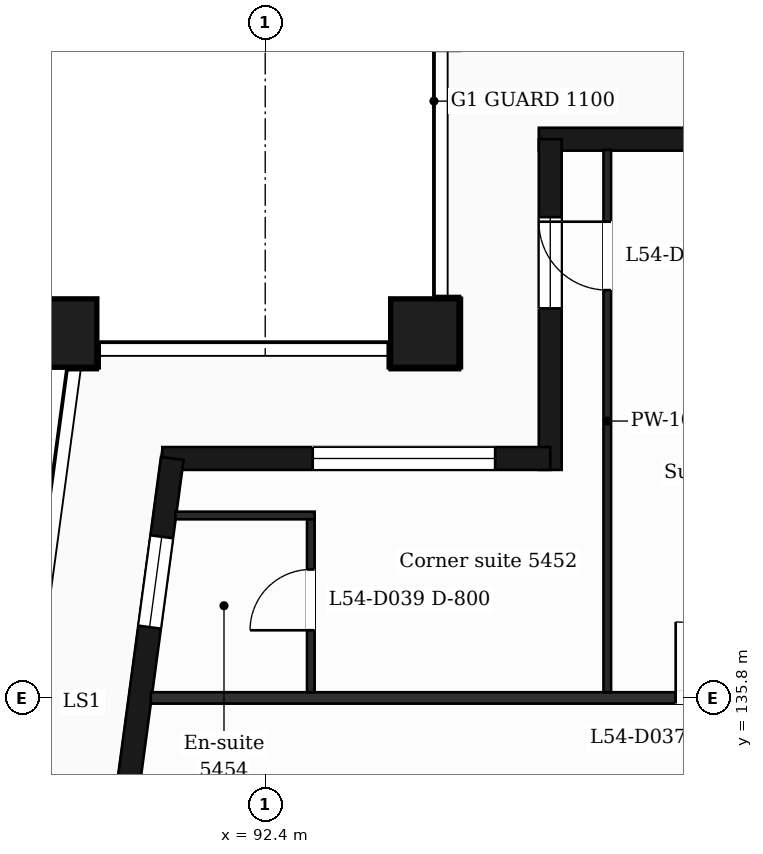
"""IFC4 building model, lengths in metres.
Left out: names, types, materials, properties, quantities, classifications, styles, units other than length and angle.
Written with IfcOpenShell. Run it as: python <this file> out.ifc"""

import sys

from ifc_helpers import new_model, si_unit, direction, frame, frame_2d, origin, origin_2d, place, context, subcontext, project, spatial, rectangle, extrude, element, fill, save


model = new_model("IFC4")
c1 = context("Model", 3, precision=1e-05, world=origin(), true_north=direction((0.0, 1.0)))
c2 = subcontext(c1, "Body", "Model", "MODEL_VIEW")
j1 = project(units=[si_unit("LENGTHUNIT", "METRE"), si_unit("PLANEANGLEUNIT", "RADIAN")], contexts=[c1])
p1 = place(None, origin())
s1 = spatial("IfcSite", under=j1, at=p1, CompositionType="ELEMENT")
p2 = place(p1, origin())
s2 = spatial("IfcBuilding", under=s1, at=p2, CompositionType="ELEMENT")
p3 = place(p2, frame((0.0, 0.0, 224.4)))
s3 = spatial("IfcBuildingStorey", under=s2, at=p3, CompositionType="ELEMENT", Elevation=224.4)
for number, where, z_axis, x_axis in (
    (1, (94.5, 140.6, 0.0), (0.0, 0.0, 1.0), (1.0, 0.0, 0.0)),
    (2, (89.735, 140.6, 0.0), (0.0, 0.0, 1.0), (1.0, 0.0, 0.0)),
):
    element("IfcColumn", number, at=place(p3, frame(where, z_axis=z_axis, x_axis=x_axis)), inside=s3, PredefinedType="COLUMN", context=c2, shape_type="SweptSolid", body=[
        extrude(rectangle(XDim=0.9, YDim=0.9, at=origin_2d()), origin(), (0.0, 0.0, 1.0), 3.7),
    ])
p4 = place(p3, frame((110.4, 143.15, 0.0), z_axis=(0.0, 0.0, 1.0), x_axis=(-1.0, 0.0, 0.0)))
e3 = element("IfcWall", 3, at=p4, inside=s3, PredefinedType="SOLIDWALL", context=c2, shape_type="SweptSolid", body=[
    extrude(rectangle(XDim=14.4, YDim=0.3, at=frame_2d((7.2, 0.0))), origin(), (0.0, 0.0, 1.0), 3.38),
])
p5 = place(p4, frame((2.1, 0.0, 0.9)))
e4 = element("IfcOpeningElement", 4, at=p5, cuts=e3, PredefinedType="OPENING", context=c2, shape_type="SweptSolid", body=[
    extrude(rectangle(XDim=2.4, YDim=2.1, at=frame_2d((1.2, 1.05))), frame((0.0, 0.16, 0.0), z_axis=(0.0, -1.0, 0.0), x_axis=(1.0, 0.0, 0.0)), (0.0, 0.0, 1.0), 0.32),
])
p6 = place(p4, frame((6.9, 0.0, 0.0)))
e5 = element("IfcOpeningElement", 5, at=p6, cuts=e3, PredefinedType="OPENING", context=c2, shape_type="SweptSolid", body=[
    extrude(rectangle(XDim=1.2, YDim=2.4, at=frame_2d((0.6, 1.2))), frame((0.0, 0.16, 0.0), z_axis=(0.0, -1.0, 0.0), x_axis=(1.0, 0.0, 0.0)), (0.0, 0.0, 1.0), 0.32),
])
p7 = place(p4, frame((11.1, 0.0, 0.9)))
e6 = element("IfcOpeningElement", 6, at=p7, cuts=e3, PredefinedType="OPENING", context=c2, shape_type="SweptSolid", body=[
    extrude(rectangle(XDim=1.2, YDim=2.1, at=frame_2d((0.6, 1.05))), frame((0.0, 0.16, 0.0), z_axis=(0.0, -1.0, 0.0), x_axis=(1.0, 0.0, 0.0)), (0.0, 0.0, 1.0), 0.32),
])
p8 = place(p3, frame((96.15, 143.15, 0.0), z_axis=(0.0, 0.0, 1.0), x_axis=(0.0, -1.0, 0.0)))
e7 = element("IfcWall", 7, at=p8, inside=s3, PredefinedType="SOLIDWALL", context=c2, shape_type="SweptSolid", body=[
    extrude(rectangle(XDim=4.35, YDim=0.3, at=frame_2d((2.175, 0.0))), origin(), (0.0, 0.0, 1.0), 3.38),
])
p9 = place(p8, frame((1.025, 0.0, 0.9)))
e8 = element("IfcOpeningElement", 8, at=p9, cuts=e7, PredefinedType="OPENING", context=c2, shape_type="SweptSolid", body=[
    extrude(rectangle(XDim=1.2, YDim=2.1, at=frame_2d((0.6, 1.05))), frame((0.0, 0.16, 0.0), z_axis=(0.0, -1.0, 0.0), x_axis=(1.0, 0.0, 0.0)), (0.0, 0.0, 1.0), 0.32),
])
p10 = place(p3, frame((96.15, 138.95, 0.0), z_axis=(0.0, 0.0, 1.0), x_axis=(-1.0, 0.0, 0.0)))
e9 = element("IfcWall", 9, at=p10, inside=s3, PredefinedType="SOLIDWALL", context=c2, shape_type="SweptSolid", body=[
    extrude(rectangle(XDim=5.104, YDim=0.3, at=frame_2d((2.552, 0.0))), origin(), (0.0, 0.0, 1.0), 3.38),
])
p11 = place(p10, frame((0.725, 0.0, 0.9)))
e10 = element("IfcOpeningElement", 10, at=p11, cuts=e9, PredefinedType="OPENING", context=c2, shape_type="SweptSolid", body=[
    extrude(rectangle(XDim=2.4, YDim=2.1, at=frame_2d((1.2, 1.05))), frame((0.0, 0.16, 0.0), z_axis=(0.0, -1.0, 0.0), x_axis=(1.0, 0.0, 0.0)), (0.0, 0.0, 1.0), 0.32),
])
p12 = place(p3, frame((91.177, 138.95, 0.0), z_axis=(0.0, 0.0, 1.0), x_axis=(-0.133426664613, -0.991058689065, 0.0)))
e11 = element("IfcWall", 11, at=p12, inside=s3, PredefinedType="SOLIDWALL", context=c2, shape_type="SweptSolid", body=[
    extrude(rectangle(XDim=6.609, YDim=0.3, at=frame_2d((3.305, 0.0))), origin(), (0.0, 0.0, 1.0), 3.38),
])
p13 = place(p12, frame((1.039, 0.0, 0.9)))
e12 = element("IfcOpeningElement", 12, at=p13, cuts=e11, PredefinedType="OPENING", context=c2, shape_type="SweptSolid", body=[
    extrude(rectangle(XDim=1.2, YDim=2.1, at=frame_2d((0.6, 1.05))), frame((0.0, 0.16, 0.0), z_axis=(0.0, -1.0, 0.0), x_axis=(1.0, 0.0, 0.0)), (0.0, 0.0, 1.0), 0.32),
])
p14 = place(p12, frame((4.294, 0.0, 0.0)))
e13 = element("IfcOpeningElement", 13, at=p14, cuts=e11, PredefinedType="OPENING", context=c2, shape_type="SweptSolid", body=[
    extrude(rectangle(XDim=1.2, YDim=2.4, at=frame_2d((0.6, 1.2))), frame((0.0, 0.16, 0.0), z_axis=(0.0, -1.0, 0.0), x_axis=(1.0, 0.0, 0.0)), (0.0, 0.0, 1.0), 0.32),
])
p15 = place(p3, frame((90.895, 135.8, 0.0), z_axis=(0.0, 0.0, 1.0), x_axis=(1.0, 0.0, 0.0)))
e14 = element("IfcWall", 14, at=p15, inside=s3, PredefinedType="PARTITIONING", context=c2, shape_type="SweptSolid", body=[
    extrude(rectangle(XDim=45.011, YDim=0.15, at=frame_2d((22.505, 0.0))), origin(), (0.0, 0.0, 1.0), 3.38),
])
p16 = place(p15, frame((6.906, 0.0, 0.0)))
e15 = element("IfcOpeningElement", 15, at=p16, cuts=e14, PredefinedType="OPENING", context=c2, shape_type="SweptSolid", body=[
    extrude(rectangle(XDim=1.0, YDim=2.1, at=frame_2d((0.5, 1.05))), frame((0.0, 0.085, 0.0), z_axis=(0.0, -1.0, 0.0), x_axis=(1.0, 0.0, 0.0)), (0.0, 0.0, 1.0), 0.17),
])
p17 = place(p15, frame((15.281, 0.0, 0.0)))
e16 = element("IfcOpeningElement", 16, at=p17, cuts=e14, PredefinedType="OPENING", context=c2, shape_type="SweptSolid", body=[
    extrude(rectangle(XDim=1.0, YDim=2.1, at=frame_2d((0.5, 1.05))), frame((0.0, 0.085, 0.0), z_axis=(0.0, -1.0, 0.0), x_axis=(1.0, 0.0, 0.0)), (0.0, 0.0, 1.0), 0.17),
])
p18 = place(p15, frame((25.045, 0.0, 0.0)))
e17 = element("IfcOpeningElement", 17, at=p18, cuts=e14, PredefinedType="OPENING", context=c2, shape_type="SweptSolid", body=[
    extrude(rectangle(XDim=1.0, YDim=2.1, at=frame_2d((0.5, 1.05))), frame((0.0, 0.085, 0.0), z_axis=(0.0, -1.0, 0.0), x_axis=(1.0, 0.0, 0.0)), (0.0, 0.0, 1.0), 0.17),
])
p19 = place(p15, frame((29.531, 0.0, 0.0)))
e18 = element("IfcOpeningElement", 18, at=p19, cuts=e14, PredefinedType="OPENING", context=c2, shape_type="SweptSolid", body=[
    extrude(rectangle(XDim=0.95, YDim=2.1, at=frame_2d((0.475, 1.05))), frame((0.0, 0.085, 0.0), z_axis=(0.0, -1.0, 0.0), x_axis=(1.0, 0.0, 0.0)), (0.0, 0.0, 1.0), 0.17),
])
p20 = place(p15, frame((39.814, 0.0, 0.0)))
e19 = element("IfcOpeningElement", 19, at=p20, cuts=e14, PredefinedType="OPENING", context=c2, shape_type="SweptSolid", body=[
    extrude(rectangle(XDim=0.95, YDim=2.1, at=frame_2d((0.475, 1.05))), frame((0.0, 0.085, 0.0), z_axis=(0.0, -1.0, 0.0), x_axis=(1.0, 0.0, 0.0)), (0.0, 0.0, 1.0), 0.17),
])
p21 = place(p3, frame((91.218, 138.2, 0.0), z_axis=(0.0, 0.0, 1.0), x_axis=(1.0, 0.0, 0.0)))
e20 = element("IfcWall", 20, at=p21, inside=s3, PredefinedType="PARTITIONING", context=c2, shape_type="SweptSolid", body=[
    extrude(rectangle(XDim=1.832, YDim=0.1, at=frame_2d((0.916, 0.0))), origin(), (0.0, 0.0, 1.0), 3.38),
])
p22 = place(p3, frame((93.0, 135.875, 0.0), z_axis=(0.0, 0.0, 1.0), x_axis=(0.0, 1.0, 0.0)))
e21 = element("IfcWall", 21, at=p22, inside=s3, PredefinedType="PARTITIONING", context=c2, shape_type="SweptSolid", body=[
    extrude(rectangle(XDim=2.275, YDim=0.1, at=frame_2d((1.137, 0.0))), origin(), (0.0, 0.0, 1.0), 3.38),
])
p23 = place(p22, frame((0.815, 0.0, 0.0)))
e22 = element("IfcOpeningElement", 22, at=p23, cuts=e21, PredefinedType="OPENING", context=c2, shape_type="SweptSolid", body=[
    extrude(rectangle(XDim=0.8, YDim=2.1, at=frame_2d((0.4, 1.05))), frame((0.0, 0.06, 0.0), z_axis=(0.0, -1.0, 0.0), x_axis=(1.0, 0.0, 0.0)), (0.0, 0.0, 1.0), 0.12),
])
p24 = place(p3, frame((96.9, 135.875, 0.0), z_axis=(0.0, 0.0, 1.0), x_axis=(0.0, 1.0, 0.0)))
e23 = element("IfcWall", 23, at=p24, inside=s3, PredefinedType="PARTITIONING", context=c2, shape_type="SweptSolid", body=[
    extrude(rectangle(XDim=7.135, YDim=0.1, at=frame_2d((3.567, 0.0))), origin(), (0.0, 0.0, 1.0), 3.38),
])
p25 = place(p24, frame((5.29, 0.0, 0.0)))
e24 = element("IfcOpeningElement", 24, at=p25, cuts=e23, PredefinedType="OPENING", context=c2, shape_type="SweptSolid", body=[
    extrude(rectangle(XDim=0.9, YDim=2.1, at=frame_2d((0.45, 1.05))), frame((0.0, 0.06, 0.0), z_axis=(0.0, -1.0, 0.0), x_axis=(1.0, 0.0, 0.0)), (0.0, 0.0, 1.0), 0.12),
])
p26 = place(p9, origin())
e25 = element("IfcWindow", 25, at=p26, inside=s3, PartitioningType="SINGLE_PANEL", PredefinedType="WINDOW", context=c2, shape_type="SweptSolid", body=[
    extrude(rectangle(XDim=1.2, YDim=2.1, at=frame_2d((0.6, 1.05))), frame((0.0, 0.03, 0.0), z_axis=(0.0, -1.0, 0.0), x_axis=(1.0, 0.0, 0.0)), (0.0, 0.0, 1.0), 0.06),
])
fill(e8, e25)
p27 = place(p11, origin())
e26 = element("IfcWindow", 26, at=p27, inside=s3, PartitioningType="SINGLE_PANEL", PredefinedType="WINDOW", context=c2, shape_type="SweptSolid", body=[
    extrude(rectangle(XDim=2.4, YDim=2.1, at=frame_2d((1.2, 1.05))), frame((0.0, 0.03, 0.0), z_axis=(0.0, -1.0, 0.0), x_axis=(1.0, 0.0, 0.0)), (0.0, 0.0, 1.0), 0.06),
])
fill(e10, e26)
p28 = place(p13, origin())
e27 = element("IfcWindow", 27, at=p28, inside=s3, PartitioningType="SINGLE_PANEL", PredefinedType="WINDOW", context=c2, shape_type="SweptSolid", body=[
    extrude(rectangle(XDim=1.2, YDim=2.1, at=frame_2d((0.6, 1.05))), frame((0.0, 0.03, 0.0), z_axis=(0.0, -1.0, 0.0), x_axis=(1.0, 0.0, 0.0)), (0.0, 0.0, 1.0), 0.06),
])
fill(e12, e27)
p29 = place(p16, origin())
e28 = element("IfcDoor", 28, at=p29, inside=s3, OperationType="SINGLE_SWING_LEFT", PredefinedType="DOOR", context=c2, shape_type="SweptSolid", body=[
    extrude(rectangle(XDim=1.0, YDim=2.1, at=frame_2d((0.5, 1.05))), frame((0.0, 0.025, 0.0), z_axis=(0.0, -1.0, 0.0), x_axis=(1.0, 0.0, 0.0)), (0.0, 0.0, 1.0), 0.05),
])
fill(e15, e28)
p30 = place(p25, origin())
e29 = element("IfcDoor", 29, at=p30, inside=s3, OperationType="SINGLE_SWING_RIGHT", PredefinedType="DOOR", context=c2, shape_type="SweptSolid", body=[
    extrude(rectangle(XDim=0.9, YDim=2.1, at=frame_2d((0.45, 1.05))), frame((0.0, 0.025, 0.0), z_axis=(0.0, -1.0, 0.0), x_axis=(1.0, 0.0, 0.0)), (0.0, 0.0, 1.0), 0.05),
])
fill(e24, e29)
p31 = place(p23, origin())
e30 = element("IfcDoor", 30, at=p31, inside=s3, OperationType="SINGLE_SWING_LEFT", PredefinedType="DOOR", context=c2, shape_type="SweptSolid", body=[
    extrude(rectangle(XDim=0.8, YDim=2.1, at=frame_2d((0.4, 1.05))), frame((0.0, 0.025, 0.0), z_axis=(0.0, -1.0, 0.0), x_axis=(1.0, 0.0, 0.0)), (0.0, 0.0, 1.0), 0.05),
])
fill(e22, e30)
save(model, sys.argv[1])
